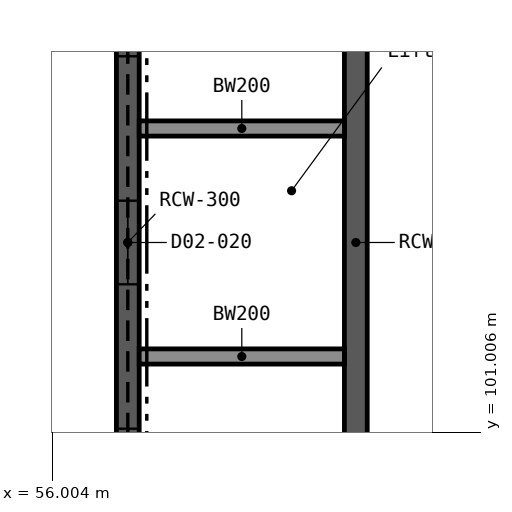
"""IFC4 building model, lengths in metres.
Left out: names, types, materials, properties, quantities, classifications, styles, units other than length and angle.
Written with IfcOpenShell. Run it as: python <this file> out.ifc"""

import sys

from ifc_helpers import new_model, si_unit, direction, frame, frame_2d, origin, place, context, subcontext, project, spatial, rectangle, extrude, element, fill, save


model = new_model("IFC4")
c1 = context("Model", 3, precision=1e-05, world=origin(), true_north=direction((0.0, 1.0)))
c2 = subcontext(c1, "Body", "Model", "MODEL_VIEW")
j1 = project(units=[si_unit("LENGTHUNIT", "METRE"), si_unit("PLANEANGLEUNIT", "RADIAN")], contexts=[c1])
p1 = place(None, origin())
s1 = spatial("IfcSite", under=j1, at=p1, CompositionType="ELEMENT")
p2 = place(p1, origin())
s2 = spatial("IfcBuilding", under=s1, at=p2, CompositionType="ELEMENT")
p3 = place(p2, frame((0.0, 0.0, 10.8)))
s3 = spatial("IfcBuildingStorey", under=s2, at=p3, CompositionType="ELEMENT", Elevation=10.8)
p4 = place(p3, frame((57.0, 99.15, 0.0), z_axis=(0.0, 0.0, 1.0), x_axis=(0.0, 1.0, 0.0)))
e1 = element("IfcWall", 1, at=p4, inside=s3, PredefinedType="SHEAR", context=c2, shape_type="SweptSolid", body=[
    extrude(rectangle(XDim=8.7, YDim=0.3, at=frame_2d((4.35, 0.0))), origin(), (0.0, 0.0, 1.0), 5.4),
])
p5 = place(p4, frame((0.8, 0.0, 0.0)))
e2 = element("IfcOpeningElement", 2, at=p5, cuts=e1, PredefinedType="OPENING", context=c2, shape_type="SweptSolid", body=[
    extrude(rectangle(XDim=1.1, YDim=2.1, at=frame_2d((0.55, 1.05))), frame((0.0, 0.161, 0.0), z_axis=(0.0, -1.0, 0.0), x_axis=(1.0, 0.0, 0.0)), (0.0, 0.0, 1.0), 0.322),
])
p6 = place(p4, frame((3.8, 0.0, 0.0)))
e3 = element("IfcOpeningElement", 3, at=p6, cuts=e1, PredefinedType="OPENING", context=c2, shape_type="SweptSolid", body=[
    extrude(rectangle(XDim=1.1, YDim=2.1, at=frame_2d((0.55, 1.05))), frame((0.0, 0.161, 0.0), z_axis=(0.0, -1.0, 0.0), x_axis=(1.0, 0.0, 0.0)), (0.0, 0.0, 1.0), 0.322),
])
p7 = place(p4, frame((6.8, 0.0, 0.0)))
e4 = element("IfcOpeningElement", 4, at=p7, cuts=e1, PredefinedType="OPENING", context=c2, shape_type="SweptSolid", body=[
    extrude(rectangle(XDim=1.1, YDim=2.1, at=frame_2d((0.55, 1.05))), frame((0.0, 0.161, 0.0), z_axis=(0.0, -1.0, 0.0), x_axis=(1.0, 0.0, 0.0)), (0.0, 0.0, 1.0), 0.322),
])
p8 = place(p3, frame((60.0, 99.15, 0.0), z_axis=(0.0, 0.0, 1.0), x_axis=(0.0, 1.0, 0.0)))
e5 = element("IfcWall", 5, at=p8, inside=s3, PredefinedType="SHEAR", context=c2, shape_type="SweptSolid", body=[
    extrude(rectangle(XDim=8.7, YDim=0.3, at=frame_2d((4.35, 0.0))), origin(), (0.0, 0.0, 1.0), 5.4),
])
for number, where, z_axis, x_axis in (
    (6, (57.15, 102.0, 0.0), (0.0, 0.0, 1.0), (1.0, 0.0, 0.0)),
    (7, (57.15, 105.0, 0.0), (0.0, 0.0, 1.0), (1.0, 0.0, 0.0)),
):
    element("IfcWall", number, at=place(p3, frame(where, z_axis=z_axis, x_axis=x_axis)), inside=s3, PredefinedType="SOLIDWALL", context=c2, shape_type="SweptSolid", body=[
        extrude(rectangle(XDim=2.7, YDim=0.2, at=frame_2d((1.35, 0.0))), origin(), (0.0, 0.0, 1.0), 5.4),
    ])
p9 = place(p5, origin())
e8 = element("IfcDoor", 8, at=p9, inside=s3, OperationType="DOUBLE_DOOR_SLIDING", PredefinedType="DOOR", context=c2, shape_type="SweptSolid", body=[
    extrude(rectangle(XDim=1.1, YDim=2.1, at=frame_2d((0.55, 1.05))), frame((0.0, 0.025, 0.0), z_axis=(0.0, -1.0, 0.0), x_axis=(1.0, 0.0, 0.0)), (0.0, 0.0, 1.0), 0.05),
])
fill(e2, e8)
p10 = place(p6, origin())
e9 = element("IfcDoor", 9, at=p10, inside=s3, OperationType="DOUBLE_DOOR_SLIDING", PredefinedType="DOOR", context=c2, shape_type="SweptSolid", body=[
    extrude(rectangle(XDim=1.1, YDim=2.1, at=frame_2d((0.55, 1.05))), frame((0.0, 0.025, 0.0), z_axis=(0.0, -1.0, 0.0), x_axis=(1.0, 0.0, 0.0)), (0.0, 0.0, 1.0), 0.05),
])
fill(e3, e9)
p11 = place(p7, origin())
e10 = element("IfcDoor", 10, at=p11, inside=s3, OperationType="DOUBLE_DOOR_SLIDING", PredefinedType="DOOR", context=c2, shape_type="SweptSolid", body=[
    extrude(rectangle(XDim=1.1, YDim=2.1, at=frame_2d((0.55, 1.05))), frame((0.0, 0.025, 0.0), z_axis=(0.0, -1.0, 0.0), x_axis=(1.0, 0.0, 0.0)), (0.0, 0.0, 1.0), 0.05),
])
fill(e4, e10)
save(model, sys.argv[1])
